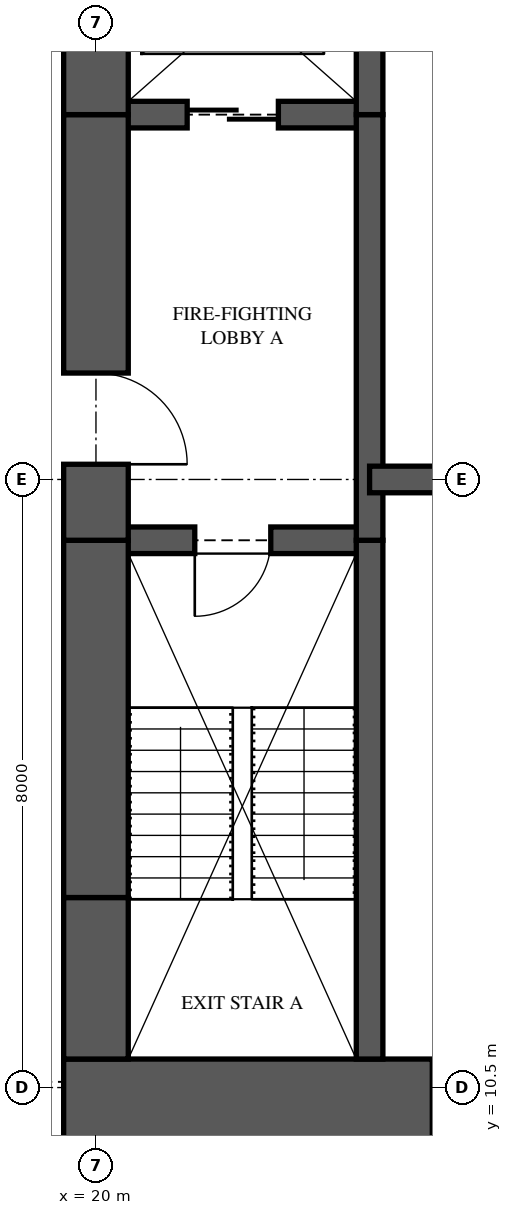
"""IFC4 building model, lengths in metres.
Left out: names, types, materials, properties, quantities, classifications, styles, units other than length and angle.
Written with IfcOpenShell. Run it as: python <this file> out.ifc"""

import sys

from ifc_helpers import new_model, si_unit, direction, frame, frame_2d, origin, place, context, subcontext, project, spatial, rectangle, extrude, element, fill, save


model = new_model("IFC4")
c1 = context("Model", 3, precision=1e-05, world=origin(), true_north=direction((0.0, 1.0)))
c2 = subcontext(c1, "Body", "Model", "MODEL_VIEW")
j1 = project(units=[si_unit("LENGTHUNIT", "METRE"), si_unit("PLANEANGLEUNIT", "RADIAN")], contexts=[c1])
p1 = place(None, origin())
s1 = spatial("IfcSite", under=j1, at=p1, CompositionType="ELEMENT")
p2 = place(p1, origin())
s2 = spatial("IfcBuilding", under=s1, at=p2, CompositionType="ELEMENT")
p3 = place(p2, frame((0.0, 0.0, 84.75)))
s3 = spatial("IfcBuildingStorey", under=s2, at=p3, CompositionType="ELEMENT", Elevation=84.75)
p4 = place(p3, frame((19.575, 10.125, 0.0), z_axis=(0.0, 0.0, 1.0), x_axis=(1.0, 0.0, 0.0)))
e1 = element("IfcWall", 1, at=p4, inside=s3, PredefinedType="SHEAR", context=c2, shape_type="SweptSolid", body=[
    extrude(rectangle(XDim=6.425, YDim=1.5, at=frame_2d((3.212, 0.0))), origin(), (0.0, 0.0, 1.0), 3.35),
])
p5 = place(p4, frame((4.85, 0.0, 0.0)))
e2 = element("IfcOpeningElement", 2, at=p5, cuts=e1, PredefinedType="OPENING", context=c2, shape_type="SweptSolid", body=[
    extrude(rectangle(XDim=0.75, YDim=2.1, at=frame_2d((0.375, 1.05))), frame((0.0, 0.76, 0.0), z_axis=(0.0, -1.0, 0.0), x_axis=(1.0, 0.0, 0.0)), (0.0, 0.0, 1.0), 1.52),
])
p6 = place(p3, frame((20.0, 26.125, 0.0), z_axis=(0.0, 0.0, 1.0), x_axis=(0.0, -1.0, 0.0)))
e3 = element("IfcWall", 3, at=p6, inside=s3, PredefinedType="SHEAR", context=c2, shape_type="SweptSolid", body=[
    extrude(rectangle(XDim=2.825, YDim=0.85, at=frame_2d((1.413, 0.0))), origin(), (0.0, 0.0, 1.0), 3.35),
])
p7 = place(p3, frame((20.0, 23.3, 0.0), z_axis=(0.0, 0.0, 1.0), x_axis=(0.0, -1.0, 0.0)))
e4 = element("IfcWall", 4, at=p7, inside=s3, PredefinedType="SHEAR", context=c2, shape_type="SweptSolid", body=[
    extrude(rectangle(XDim=5.6, YDim=0.85, at=frame_2d((2.8, 0.0))), origin(), (0.0, 0.0, 1.0), 3.35),
])
p8 = place(p7, frame((3.4, 0.0, 0.0)))
e5 = element("IfcOpeningElement", 5, at=p8, cuts=e4, PredefinedType="OPENING", context=c2, shape_type="SweptSolid", body=[
    extrude(rectangle(XDim=1.2, YDim=2.2, at=frame_2d((0.6, 1.1))), frame((0.0, 0.435, 0.0), z_axis=(0.0, -1.0, 0.0), x_axis=(1.0, 0.0, 0.0)), (0.0, 0.0, 1.0), 0.87),
])
p9 = place(p3, frame((20.0, 17.7, 0.0), z_axis=(0.0, 0.0, 1.0), x_axis=(0.0, -1.0, 0.0)))
e6 = element("IfcWall", 6, at=p9, inside=s3, PredefinedType="SHEAR", context=c2, shape_type="SweptSolid", body=[
    extrude(rectangle(XDim=4.7, YDim=0.85, at=frame_2d((2.35, 0.0))), origin(), (0.0, 0.0, 1.0), 3.35),
])
p10 = place(p3, frame((20.0, 13.0, 0.0), z_axis=(0.0, 0.0, 1.0), x_axis=(0.0, -1.0, 0.0)))
e7 = element("IfcWall", 7, at=p10, inside=s3, PredefinedType="SHEAR", context=c2, shape_type="SweptSolid", body=[
    extrude(rectangle(XDim=2.125, YDim=0.85, at=frame_2d((1.062, 0.0))), origin(), (0.0, 0.0, 1.0), 3.35),
])
p11 = place(p3, frame((23.6, 10.875, 0.0), z_axis=(0.0, 0.0, 1.0), x_axis=(0.0, 1.0, 0.0)))
e8 = element("IfcWall", 8, at=p11, inside=s3, PredefinedType="SHEAR", context=c2, shape_type="SweptSolid", body=[
    extrude(rectangle(XDim=6.825, YDim=0.35, at=frame_2d((3.413, 0.0))), origin(), (0.0, 0.0, 1.0), 3.35),
])
p12 = place(p3, frame((23.6, 17.7, 0.0), z_axis=(0.0, 0.0, 1.0), x_axis=(0.0, 1.0, 0.0)))
e9 = element("IfcWall", 9, at=p12, inside=s3, PredefinedType="SHEAR", context=c2, shape_type="SweptSolid", body=[
    extrude(rectangle(XDim=5.6, YDim=0.35, at=frame_2d((2.8, 0.0))), origin(), (0.0, 0.0, 1.0), 3.35),
])
p13 = place(p3, frame((23.6, 23.3, 0.0), z_axis=(0.0, 0.0, 1.0), x_axis=(0.0, 1.0, 0.0)))
e10 = element("IfcWall", 10, at=p13, inside=s3, PredefinedType="SHEAR", context=c2, shape_type="SweptSolid", body=[
    extrude(rectangle(XDim=2.825, YDim=0.35, at=frame_2d((1.413, 0.0))), origin(), (0.0, 0.0, 1.0), 3.35),
])
p14 = place(p3, frame((20.0, 17.7, 0.0), z_axis=(0.0, 0.0, 1.0), x_axis=(1.0, 0.0, 0.0)))
e11 = element("IfcWall", 11, at=p14, inside=s3, PredefinedType="SHEAR", context=c2, shape_type="SweptSolid", body=[
    extrude(rectangle(XDim=3.6, YDim=0.35, at=frame_2d((1.8, 0.0))), origin(), (0.0, 0.0, 1.0), 3.35),
])
p15 = place(p14, frame((1.3, 0.0, 0.0)))
e12 = element("IfcOpeningElement", 12, at=p15, cuts=e11, PredefinedType="OPENING", context=c2, shape_type="SweptSolid", body=[
    extrude(rectangle(XDim=1.0, YDim=2.1, at=frame_2d((0.5, 1.05))), frame((0.0, 0.185, 0.0), z_axis=(0.0, -1.0, 0.0), x_axis=(1.0, 0.0, 0.0)), (0.0, 0.0, 1.0), 0.37),
])
p16 = place(p3, frame((20.0, 23.3, 0.0), z_axis=(0.0, 0.0, 1.0), x_axis=(1.0, 0.0, 0.0)))
e13 = element("IfcWall", 13, at=p16, inside=s3, PredefinedType="SHEAR", context=c2, shape_type="SweptSolid", body=[
    extrude(rectangle(XDim=3.6, YDim=0.35, at=frame_2d((1.8, 0.0))), origin(), (0.0, 0.0, 1.0), 3.35),
])
p17 = place(p16, frame((1.2, 0.0, 0.0)))
e14 = element("IfcOpeningElement", 14, at=p17, cuts=e13, PredefinedType="OPENING", context=c2, shape_type="SweptSolid", body=[
    extrude(rectangle(XDim=1.2, YDim=2.1, at=frame_2d((0.6, 1.05))), frame((0.0, 0.185, 0.0), z_axis=(0.0, -1.0, 0.0), x_axis=(1.0, 0.0, 0.0)), (0.0, 0.0, 1.0), 0.37),
])
p18 = place(p3, frame((23.6, 18.5, 0.0), z_axis=(0.0, 0.0, 1.0), x_axis=(1.0, 0.0, 0.0)))
e15 = element("IfcWall", 15, at=p18, inside=s3, PredefinedType="SHEAR", context=c2, shape_type="SweptSolid", body=[
    extrude(rectangle(XDim=2.4, YDim=0.35, at=frame_2d((1.2, 0.0))), origin(), (0.0, 0.0, 1.0), 3.35),
])
p19 = place(p15, frame((1.0, 0.0, 0.0), z_axis=(0.0, 0.0, 1.0), x_axis=(-1.0, 0.0, 0.0)))
e16 = element("IfcDoor", 16, at=p19, inside=s3, OperationType="SINGLE_SWING_RIGHT", PredefinedType="DOOR", context=c2, shape_type="SweptSolid", body=[
    extrude(rectangle(XDim=1.0, YDim=2.1, at=frame_2d((0.5, 1.05))), frame((0.0, 0.025, 0.0), z_axis=(0.0, -1.0, 0.0), x_axis=(1.0, 0.0, 0.0)), (0.0, 0.0, 1.0), 0.05),
])
fill(e12, e16)
p20 = place(p8, origin())
e17 = element("IfcDoor", 17, at=p20, inside=s3, OperationType="SINGLE_SWING_RIGHT", PredefinedType="DOOR", context=c2, shape_type="SweptSolid", body=[
    extrude(rectangle(XDim=1.2, YDim=2.2, at=frame_2d((0.6, 1.1))), frame((0.0, 0.025, 0.0), z_axis=(0.0, -1.0, 0.0), x_axis=(1.0, 0.0, 0.0)), (0.0, 0.0, 1.0), 0.05),
])
fill(e5, e17)
p21 = place(p17, origin())
e18 = element("IfcDoor", 18, at=p21, inside=s3, OperationType="SLIDING_TO_LEFT", PredefinedType="DOOR", context=c2, shape_type="SweptSolid", body=[
    extrude(rectangle(XDim=1.2, YDim=2.1, at=frame_2d((0.6, 1.05))), frame((0.0, 0.025, 0.0), z_axis=(0.0, -1.0, 0.0), x_axis=(1.0, 0.0, 0.0)), (0.0, 0.0, 1.0), 0.05),
])
fill(e14, e18)
save(model, sys.argv[1])
